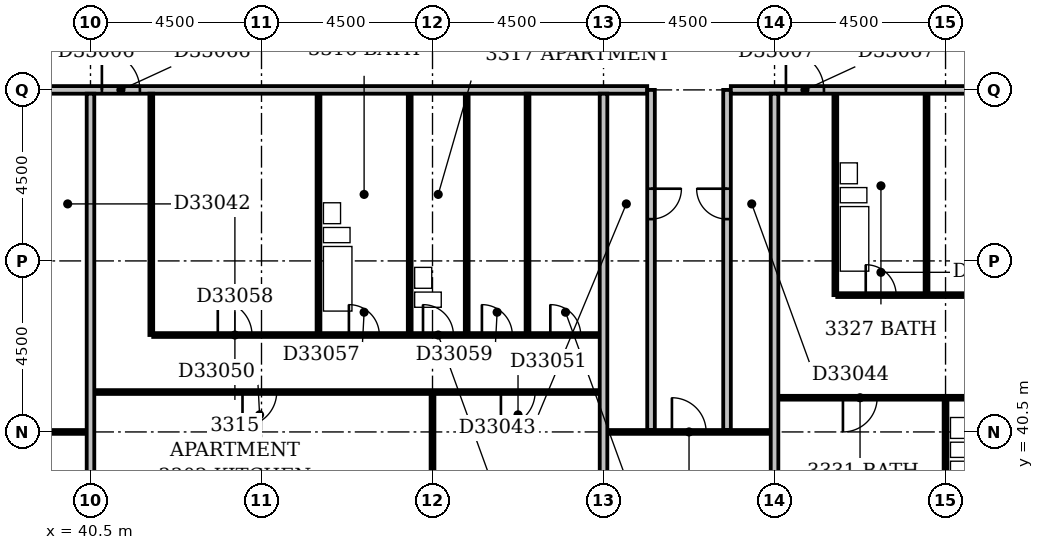
"""IFC4 building model, lengths in metres.
Left out: names, types, materials, properties, quantities, classifications, styles, units other than length and angle.
Written with IfcOpenShell. Run it as: python <this file> out.ifc"""

import sys

from ifc_helpers import new_model, si_unit, direction, frame, frame_2d, origin, place, context, subcontext, project, spatial, rectangle, extrude, element, fill, save


model = new_model("IFC4")
c1 = context("Model", 3, precision=1e-05, world=origin(), true_north=direction((0.0, 1.0)))
c2 = subcontext(c1, "Body", "Model", "MODEL_VIEW")
j1 = project(units=[si_unit("LENGTHUNIT", "METRE"), si_unit("PLANEANGLEUNIT", "RADIAN")], contexts=[c1])
p1 = place(None, origin())
s1 = spatial("IfcSite", under=j1, at=p1, CompositionType="ELEMENT")
p2 = place(p1, origin())
s2 = spatial("IfcBuilding", under=s1, at=p2, CompositionType="ELEMENT")
p3 = place(p2, frame((0.0, 0.0, 134.0)))
s3 = spatial("IfcBuildingStorey", under=s2, at=p3, CompositionType="ELEMENT", Elevation=134.0)
p4 = place(p3, frame((40.5, 36.5, 0.0), z_axis=(0.0, 0.0, 1.0), x_axis=(0.0, 1.0, 0.0)))
e1 = element("IfcWall", 1, at=p4, inside=s3, PredefinedType="PARTITIONING", context=c2, shape_type="SweptSolid", body=[
    extrude(rectangle(XDim=12.9, YDim=0.2, at=frame_2d((6.45, 0.0))), origin(), (0.0, 0.0, 1.0), 3.3),
])
p5 = place(p3, frame((49.5, 36.5, 0.0), z_axis=(0.0, 0.0, 1.0), x_axis=(0.0, 1.0, 0.0)))
e2 = element("IfcWall", 2, at=p5, inside=s3, PredefinedType="PARTITIONING", context=c2, shape_type="SweptSolid", body=[
    extrude(rectangle(XDim=5.0, YDim=0.1, at=frame_2d((2.5, 0.0))), origin(), (0.0, 0.0, 1.0), 3.3),
])
p6 = place(p3, frame((54.0, 36.5, 0.0), z_axis=(0.0, 0.0, 1.0), x_axis=(0.0, 1.0, 0.0)))
e3 = element("IfcWall", 3, at=p6, inside=s3, PredefinedType="PARTITIONING", context=c2, shape_type="SweptSolid", body=[
    extrude(rectangle(XDim=12.9, YDim=0.2, at=frame_2d((6.45, 0.0))), origin(), (0.0, 0.0, 1.0), 2.6),
])
p7 = place(p3, frame((58.5, 36.5, 0.0), z_axis=(0.0, 0.0, 1.0), x_axis=(0.0, 1.0, 0.0)))
e4 = element("IfcWall", 4, at=p7, inside=s3, PredefinedType="PARTITIONING", context=c2, shape_type="SweptSolid", body=[
    extrude(rectangle(XDim=12.9, YDim=0.2, at=frame_2d((6.45, 0.0))), origin(), (0.0, 0.0, 1.0), 3.3),
])
p8 = place(p3, frame((63.0, 36.5, 0.0), z_axis=(0.0, 0.0, 1.0), x_axis=(0.0, 1.0, 0.0)))
e5 = element("IfcWall", 5, at=p8, inside=s3, PredefinedType="PARTITIONING", context=c2, shape_type="SweptSolid", body=[
    extrude(rectangle(XDim=4.85, YDim=0.1, at=frame_2d((2.425, 0.0))), origin(), (0.0, 0.0, 1.0), 2.4),
])
p9 = place(p3, frame((36.1, 40.5, 0.0), z_axis=(0.0, 0.0, 1.0), x_axis=(1.0, 0.0, 0.0)))
e6 = element("IfcWall", 6, at=p9, inside=s3, PredefinedType="PARTITIONING", context=c2, shape_type="SweptSolid", body=[
    extrude(rectangle(XDim=4.3, YDim=0.1, at=frame_2d((2.15, 0.0))), origin(), (0.0, 0.0, 1.0), 3.3),
])
p10 = place(p9, frame((1.7, 0.0, 0.0)))
e7 = element("IfcOpeningElement", 7, at=p10, cuts=e6, PredefinedType="OPENING", context=c2, shape_type="SweptSolid", body=[
    extrude(rectangle(XDim=0.9, YDim=2.1, at=frame_2d((0.45, 1.05))), frame((0.0, 0.062, 0.0), z_axis=(0.0, -1.0, 0.0), x_axis=(1.0, 0.0, 0.0)), (0.0, 0.0, 1.0), 0.124),
])
p11 = place(p3, frame((54.1, 40.5, 0.0), z_axis=(0.0, 0.0, 1.0), x_axis=(1.0, 0.0, 0.0)))
e8 = element("IfcWall", 8, at=p11, inside=s3, PredefinedType="PARTITIONING", context=c2, shape_type="SweptSolid", body=[
    extrude(rectangle(XDim=4.3, YDim=0.1, at=frame_2d((2.15, 0.0))), origin(), (0.0, 0.0, 1.0), 3.3),
])
p12 = place(p11, frame((1.7, 0.0, 0.0)))
e9 = element("IfcOpeningElement", 9, at=p12, cuts=e8, PredefinedType="OPENING", context=c2, shape_type="SweptSolid", body=[
    extrude(rectangle(XDim=0.9, YDim=2.1, at=frame_2d((0.45, 1.05))), frame((0.0, 0.062, 0.0), z_axis=(0.0, -1.0, 0.0), x_axis=(1.0, 0.0, 0.0)), (0.0, 0.0, 1.0), 0.124),
])
p13 = place(p3, frame((55.25, 40.55, 0.0), z_axis=(0.0, 0.0, 1.0), x_axis=(0.0, 1.0, 0.0)))
e10 = element("IfcWall", 10, at=p13, inside=s3, PredefinedType="PARTITIONING", context=c2, shape_type="SweptSolid", body=[
    extrude(rectangle(XDim=8.95, YDim=0.2, at=frame_2d((4.475, 0.0))), origin(), (0.0, 0.0, 1.0), 3.3),
])
p14 = place(p13, frame((5.55, 0.0, 0.0)))
e11 = element("IfcOpeningElement", 11, at=p14, cuts=e10, PredefinedType="OPENING", context=c2, shape_type="SweptSolid", body=[
    extrude(rectangle(XDim=0.8, YDim=2.1, at=frame_2d((0.4, 1.05))), frame((0.0, 0.112, 0.0), z_axis=(0.0, -1.0, 0.0), x_axis=(1.0, 0.0, 0.0)), (0.0, 0.0, 1.0), 0.224),
])
p15 = place(p3, frame((57.25, 40.55, 0.0), z_axis=(0.0, 0.0, 1.0), x_axis=(0.0, 1.0, 0.0)))
e12 = element("IfcWall", 12, at=p15, inside=s3, PredefinedType="PARTITIONING", context=c2, shape_type="SweptSolid", body=[
    extrude(rectangle(XDim=8.95, YDim=0.2, at=frame_2d((4.475, 0.0))), origin(), (0.0, 0.0, 1.0), 3.3),
])
p16 = place(p15, frame((5.55, 0.0, 0.0)))
e13 = element("IfcOpeningElement", 13, at=p16, cuts=e12, PredefinedType="OPENING", context=c2, shape_type="SweptSolid", body=[
    extrude(rectangle(XDim=0.8, YDim=2.1, at=frame_2d((0.4, 1.05))), frame((0.0, 0.112, 0.0), z_axis=(0.0, -1.0, 0.0), x_axis=(1.0, 0.0, 0.0)), (0.0, 0.0, 1.0), 0.224),
])
p17 = place(p3, frame((58.6, 41.4, 0.0), z_axis=(0.0, 0.0, 1.0), x_axis=(1.0, 0.0, 0.0)))
e14 = element("IfcWall", 14, at=p17, inside=s3, PredefinedType="PARTITIONING", context=c2, shape_type="SweptSolid", body=[
    extrude(rectangle(XDim=9.5, YDim=0.1, at=frame_2d((4.75, 0.0))), origin(), (0.0, 0.0, 1.0), 3.3),
])
p18 = place(p17, frame((1.7, 0.0, 0.0)))
e15 = element("IfcOpeningElement", 15, at=p18, cuts=e14, PredefinedType="OPENING", context=c2, shape_type="SweptSolid", body=[
    extrude(rectangle(XDim=0.9, YDim=2.1, at=frame_2d((0.45, 1.05))), frame((0.0, 0.062, 0.0), z_axis=(0.0, -1.0, 0.0), x_axis=(1.0, 0.0, 0.0)), (0.0, 0.0, 1.0), 0.124),
])
p19 = place(p17, frame((7.35, 0.0, 0.0)))
e16 = element("IfcOpeningElement", 16, at=p19, cuts=e14, PredefinedType="OPENING", context=c2, shape_type="SweptSolid", body=[
    extrude(rectangle(XDim=0.9, YDim=2.1, at=frame_2d((0.45, 1.05))), frame((0.0, 0.062, 0.0), z_axis=(0.0, -1.0, 0.0), x_axis=(1.0, 0.0, 0.0)), (0.0, 0.0, 1.0), 0.124),
])
p20 = place(p3, frame((40.6, 41.55, 0.0), z_axis=(0.0, 0.0, 1.0), x_axis=(1.0, 0.0, 0.0)))
e17 = element("IfcWall", 17, at=p20, inside=s3, PredefinedType="PARTITIONING", context=c2, shape_type="SweptSolid", body=[
    extrude(rectangle(XDim=13.3, YDim=0.1, at=frame_2d((6.65, 0.0))), origin(), (0.0, 0.0, 1.0), 3.3),
])
p21 = place(p20, frame((3.9, 0.0, 0.0)))
e18 = element("IfcOpeningElement", 18, at=p21, cuts=e17, PredefinedType="OPENING", context=c2, shape_type="SweptSolid", body=[
    extrude(rectangle(XDim=0.9, YDim=2.1, at=frame_2d((0.45, 1.05))), frame((0.0, 0.062, 0.0), z_axis=(0.0, -1.0, 0.0), x_axis=(1.0, 0.0, 0.0)), (0.0, 0.0, 1.0), 0.124),
])
p22 = place(p20, frame((10.7, 0.0, 0.0)))
e19 = element("IfcOpeningElement", 19, at=p22, cuts=e17, PredefinedType="OPENING", context=c2, shape_type="SweptSolid", body=[
    extrude(rectangle(XDim=0.9, YDim=2.1, at=frame_2d((0.45, 1.05))), frame((0.0, 0.062, 0.0), z_axis=(0.0, -1.0, 0.0), x_axis=(1.0, 0.0, 0.0)), (0.0, 0.0, 1.0), 0.124),
])
p23 = place(p3, frame((42.1, 43.05, 0.0), z_axis=(0.0, 0.0, 1.0), x_axis=(0.0, 1.0, 0.0)))
e20 = element("IfcWall", 20, at=p23, inside=s3, PredefinedType="PARTITIONING", context=c2, shape_type="SweptSolid", body=[
    extrude(rectangle(XDim=6.35, YDim=0.1, at=frame_2d((3.175, 0.0))), origin(), (0.0, 0.0, 1.0), 3.3),
])
p24 = place(p3, frame((42.15, 43.05, 0.0), z_axis=(0.0, 0.0, 1.0), x_axis=(1.0, 0.0, 0.0)))
e21 = element("IfcWall", 21, at=p24, inside=s3, PredefinedType="PARTITIONING", context=c2, shape_type="SweptSolid", body=[
    extrude(rectangle(XDim=11.75, YDim=0.1, at=frame_2d((5.875, 0.0))), origin(), (0.0, 0.0, 1.0), 3.3),
])
p25 = place(p24, frame((5.15, 0.0, 0.0)))
e22 = element("IfcOpeningElement", 22, at=p25, cuts=e21, PredefinedType="OPENING", context=c2, shape_type="SweptSolid", body=[
    extrude(rectangle(XDim=0.8, YDim=2.1, at=frame_2d((0.4, 1.05))), frame((0.0, 0.062, 0.0), z_axis=(0.0, -1.0, 0.0), x_axis=(1.0, 0.0, 0.0)), (0.0, 0.0, 1.0), 0.124),
])
p26 = place(p24, frame((1.7, 0.0, 0.0)))
e23 = element("IfcOpeningElement", 23, at=p26, cuts=e21, PredefinedType="OPENING", context=c2, shape_type="SweptSolid", body=[
    extrude(rectangle(XDim=0.9, YDim=2.1, at=frame_2d((0.45, 1.05))), frame((0.0, 0.062, 0.0), z_axis=(0.0, -1.0, 0.0), x_axis=(1.0, 0.0, 0.0)), (0.0, 0.0, 1.0), 0.124),
])
p27 = place(p24, frame((8.65, 0.0, 0.0)))
e24 = element("IfcOpeningElement", 24, at=p27, cuts=e21, PredefinedType="OPENING", context=c2, shape_type="SweptSolid", body=[
    extrude(rectangle(XDim=0.8, YDim=2.1, at=frame_2d((0.4, 1.05))), frame((0.0, 0.062, 0.0), z_axis=(0.0, -1.0, 0.0), x_axis=(1.0, 0.0, 0.0)), (0.0, 0.0, 1.0), 0.124),
])
p28 = place(p24, frame((10.45, 0.0, 0.0)))
e25 = element("IfcOpeningElement", 25, at=p28, cuts=e21, PredefinedType="OPENING", context=c2, shape_type="SweptSolid", body=[
    extrude(rectangle(XDim=0.8, YDim=2.1, at=frame_2d((0.4, 1.05))), frame((0.0, 0.062, 0.0), z_axis=(0.0, -1.0, 0.0), x_axis=(1.0, 0.0, 0.0)), (0.0, 0.0, 1.0), 0.124),
])
p29 = place(p24, frame((7.1, 0.0, 0.0)))
e26 = element("IfcOpeningElement", 26, at=p29, cuts=e21, PredefinedType="OPENING", context=c2, shape_type="SweptSolid", body=[
    extrude(rectangle(XDim=0.8, YDim=2.1, at=frame_2d((0.4, 1.05))), frame((0.0, 0.062, 0.0), z_axis=(0.0, -1.0, 0.0), x_axis=(1.0, 0.0, 0.0)), (0.0, 0.0, 1.0), 0.124),
])
for number, where, z_axis, x_axis in (
    (27, (46.5, 43.1, 0.0), (0.0, 0.0, 1.0), (0.0, 1.0, 0.0)),
    (28, (48.9, 43.1, 0.0), (0.0, 0.0, 1.0), (0.0, 1.0, 0.0)),
    (29, (50.4, 43.1, 0.0), (0.0, 0.0, 1.0), (0.0, 1.0, 0.0)),
):
    element("IfcWall", number, at=place(p3, frame(where, z_axis=z_axis, x_axis=x_axis)), inside=s3, PredefinedType="PLUMBINGWALL", context=c2, shape_type="SweptSolid", body=[
        extrude(rectangle(XDim=6.3, YDim=0.1, at=frame_2d((3.15, 0.0))), origin(), (0.0, 0.0, 1.0), 3.3),
    ])
p30 = place(p3, frame((52.0, 43.1, 0.0), z_axis=(0.0, 0.0, 1.0), x_axis=(0.0, 1.0, 0.0)))
e30 = element("IfcWall", 30, at=p30, inside=s3, PredefinedType="PARTITIONING", context=c2, shape_type="SweptSolid", body=[
    extrude(rectangle(XDim=6.3, YDim=0.1, at=frame_2d((3.15, 0.0))), origin(), (0.0, 0.0, 1.0), 3.3),
])
p31 = place(p3, frame((60.1, 44.1, 0.0), z_axis=(0.0, 0.0, 1.0), x_axis=(0.0, 1.0, 0.0)))
e31 = element("IfcWall", 31, at=p31, inside=s3, PredefinedType="PLUMBINGWALL", context=c2, shape_type="SweptSolid", body=[
    extrude(rectangle(XDim=5.3, YDim=0.1, at=frame_2d((2.65, 0.0))), origin(), (0.0, 0.0, 1.0), 3.3),
])
p32 = place(p3, frame((60.15, 44.1, 0.0), z_axis=(0.0, 0.0, 1.0), x_axis=(1.0, 0.0, 0.0)))
e32 = element("IfcWall", 32, at=p32, inside=s3, PredefinedType="PARTITIONING", context=c2, shape_type="SweptSolid", body=[
    extrude(rectangle(XDim=7.95, YDim=0.1, at=frame_2d((3.975, 0.0))), origin(), (0.0, 0.0, 1.0), 3.3),
])
p33 = place(p32, frame((0.75, 0.0, 0.0)))
e33 = element("IfcOpeningElement", 33, at=p33, cuts=e32, PredefinedType="OPENING", context=c2, shape_type="SweptSolid", body=[
    extrude(rectangle(XDim=0.8, YDim=2.1, at=frame_2d((0.4, 1.05))), frame((0.0, 0.062, 0.0), z_axis=(0.0, -1.0, 0.0), x_axis=(1.0, 0.0, 0.0)), (0.0, 0.0, 1.0), 0.124),
])
p34 = place(p32, frame((4.4, 0.0, 0.0)))
e34 = element("IfcOpeningElement", 34, at=p34, cuts=e32, PredefinedType="OPENING", context=c2, shape_type="SweptSolid", body=[
    extrude(rectangle(XDim=0.9, YDim=2.1, at=frame_2d((0.45, 1.05))), frame((0.0, 0.062, 0.0), z_axis=(0.0, -1.0, 0.0), x_axis=(1.0, 0.0, 0.0)), (0.0, 0.0, 1.0), 0.124),
])
p35 = place(p3, frame((62.5, 44.15, 0.0), z_axis=(0.0, 0.0, 1.0), x_axis=(0.0, 1.0, 0.0)))
e35 = element("IfcWall", 35, at=p35, inside=s3, PredefinedType="PLUMBINGWALL", context=c2, shape_type="SweptSolid", body=[
    extrude(rectangle(XDim=5.25, YDim=0.1, at=frame_2d((2.625, 0.0))), origin(), (0.0, 0.0, 1.0), 2.4),
])
p36 = place(p3, frame((39.35, 49.5, 0.0), z_axis=(0.0, 0.0, 1.0), x_axis=(1.0, 0.0, 0.0)))
e36 = element("IfcWall", 36, at=p36, inside=s3, PredefinedType="PARTITIONING", context=c2, shape_type="SweptSolid", body=[
    extrude(rectangle(XDim=15.8, YDim=0.2, at=frame_2d((7.9, 0.0))), origin(), (0.0, 0.0, 1.0), 3.3),
])
p37 = place(p36, frame((1.45, 0.0, 0.0)))
e37 = element("IfcOpeningElement", 37, at=p37, cuts=e36, PredefinedType="OPENING", context=c2, shape_type="SweptSolid", body=[
    extrude(rectangle(XDim=1.0, YDim=2.1, at=frame_2d((0.5, 1.05))), frame((0.0, 0.112, 0.0), z_axis=(0.0, -1.0, 0.0), x_axis=(1.0, 0.0, 0.0)), (0.0, 0.0, 1.0), 0.224),
])
p38 = place(p3, frame((57.35, 49.5, 0.0), z_axis=(0.0, 0.0, 1.0), x_axis=(1.0, 0.0, 0.0)))
e38 = element("IfcWall", 38, at=p38, inside=s3, PredefinedType="PARTITIONING", context=c2, shape_type="SweptSolid", body=[
    extrude(rectangle(XDim=9.65, YDim=0.2, at=frame_2d((4.825, 0.0))), origin(), (0.0, 0.0, 1.0), 3.3),
])
p39 = place(p38, frame((1.45, 0.0, 0.0)))
e39 = element("IfcOpeningElement", 39, at=p39, cuts=e38, PredefinedType="OPENING", context=c2, shape_type="SweptSolid", body=[
    extrude(rectangle(XDim=1.0, YDim=2.1, at=frame_2d((0.5, 1.05))), frame((0.0, 0.112, 0.0), z_axis=(0.0, -1.0, 0.0), x_axis=(1.0, 0.0, 0.0)), (0.0, 0.0, 1.0), 0.224),
])
p40 = place(p12, origin())
e40 = element("IfcDoor", 40, at=p40, inside=s3, OperationType="SINGLE_SWING_LEFT", PredefinedType="DOOR", context=c2, shape_type="SweptSolid", body=[
    extrude(rectangle(XDim=0.9, YDim=2.1, at=frame_2d((0.45, 1.05))), frame((0.0, 0.025, 0.0), z_axis=(0.0, -1.0, 0.0), x_axis=(1.0, 0.0, 0.0)), (0.0, 0.0, 1.0), 0.05),
])
fill(e9, e40)
p41 = place(p14, origin())
e41 = element("IfcDoor", 41, at=p41, inside=s3, OperationType="SINGLE_SWING_RIGHT", PredefinedType="DOOR", context=c2, shape_type="SweptSolid", body=[
    extrude(rectangle(XDim=0.8, YDim=2.1, at=frame_2d((0.4, 1.05))), frame((0.0, 0.025, 0.0), z_axis=(0.0, -1.0, 0.0), x_axis=(1.0, 0.0, 0.0)), (0.0, 0.0, 1.0), 0.05),
])
fill(e11, e41)
p42 = place(p16, frame((0.8, 0.0, 0.0), z_axis=(0.0, 0.0, 1.0), x_axis=(-1.0, 0.0, 0.0)))
e42 = element("IfcDoor", 42, at=p42, inside=s3, OperationType="SINGLE_SWING_LEFT", PredefinedType="DOOR", context=c2, shape_type="SweptSolid", body=[
    extrude(rectangle(XDim=0.8, YDim=2.1, at=frame_2d((0.4, 1.05))), frame((0.0, 0.025, 0.0), z_axis=(0.0, -1.0, 0.0), x_axis=(1.0, 0.0, 0.0)), (0.0, 0.0, 1.0), 0.05),
])
fill(e13, e42)
p43 = place(p18, frame((0.9, 0.0, 0.0), z_axis=(0.0, 0.0, 1.0), x_axis=(-1.0, 0.0, 0.0)))
e43 = element("IfcDoor", 43, at=p43, inside=s3, OperationType="SINGLE_SWING_RIGHT", PredefinedType="DOOR", context=c2, shape_type="SweptSolid", body=[
    extrude(rectangle(XDim=0.9, YDim=2.1, at=frame_2d((0.45, 1.05))), frame((0.0, 0.025, 0.0), z_axis=(0.0, -1.0, 0.0), x_axis=(1.0, 0.0, 0.0)), (0.0, 0.0, 1.0), 0.05),
])
fill(e15, e43)
p44 = place(p21, frame((0.9, 0.0, 0.0), z_axis=(0.0, 0.0, 1.0), x_axis=(-1.0, 0.0, 0.0)))
e44 = element("IfcDoor", 44, at=p44, inside=s3, OperationType="SINGLE_SWING_RIGHT", PredefinedType="DOOR", context=c2, shape_type="SweptSolid", body=[
    extrude(rectangle(XDim=0.9, YDim=2.1, at=frame_2d((0.45, 1.05))), frame((0.0, 0.025, 0.0), z_axis=(0.0, -1.0, 0.0), x_axis=(1.0, 0.0, 0.0)), (0.0, 0.0, 1.0), 0.05),
])
fill(e18, e44)
p45 = place(p22, frame((0.9, 0.0, 0.0), z_axis=(0.0, 0.0, 1.0), x_axis=(-1.0, 0.0, 0.0)))
e45 = element("IfcDoor", 45, at=p45, inside=s3, OperationType="SINGLE_SWING_RIGHT", PredefinedType="DOOR", context=c2, shape_type="SweptSolid", body=[
    extrude(rectangle(XDim=0.9, YDim=2.1, at=frame_2d((0.45, 1.05))), frame((0.0, 0.025, 0.0), z_axis=(0.0, -1.0, 0.0), x_axis=(1.0, 0.0, 0.0)), (0.0, 0.0, 1.0), 0.05),
])
fill(e19, e45)
p46 = place(p25, origin())
e46 = element("IfcDoor", 46, at=p46, inside=s3, OperationType="SINGLE_SWING_LEFT", PredefinedType="DOOR", context=c2, shape_type="SweptSolid", body=[
    extrude(rectangle(XDim=0.8, YDim=2.1, at=frame_2d((0.4, 1.05))), frame((0.0, 0.025, 0.0), z_axis=(0.0, -1.0, 0.0), x_axis=(1.0, 0.0, 0.0)), (0.0, 0.0, 1.0), 0.05),
])
fill(e22, e46)
p47 = place(p26, origin())
e47 = element("IfcDoor", 47, at=p47, inside=s3, OperationType="SINGLE_SWING_LEFT", PredefinedType="DOOR", context=c2, shape_type="SweptSolid", body=[
    extrude(rectangle(XDim=0.9, YDim=2.1, at=frame_2d((0.45, 1.05))), frame((0.0, 0.025, 0.0), z_axis=(0.0, -1.0, 0.0), x_axis=(1.0, 0.0, 0.0)), (0.0, 0.0, 1.0), 0.05),
])
fill(e23, e47)
p48 = place(p27, origin())
e48 = element("IfcDoor", 48, at=p48, inside=s3, OperationType="SINGLE_SWING_LEFT", PredefinedType="DOOR", context=c2, shape_type="SweptSolid", body=[
    extrude(rectangle(XDim=0.8, YDim=2.1, at=frame_2d((0.4, 1.05))), frame((0.0, 0.025, 0.0), z_axis=(0.0, -1.0, 0.0), x_axis=(1.0, 0.0, 0.0)), (0.0, 0.0, 1.0), 0.05),
])
fill(e24, e48)
p49 = place(p28, origin())
e49 = element("IfcDoor", 49, at=p49, inside=s3, OperationType="SINGLE_SWING_LEFT", PredefinedType="DOOR", context=c2, shape_type="SweptSolid", body=[
    extrude(rectangle(XDim=0.8, YDim=2.1, at=frame_2d((0.4, 1.05))), frame((0.0, 0.025, 0.0), z_axis=(0.0, -1.0, 0.0), x_axis=(1.0, 0.0, 0.0)), (0.0, 0.0, 1.0), 0.05),
])
fill(e25, e49)
p50 = place(p29, origin())
e50 = element("IfcDoor", 50, at=p50, inside=s3, OperationType="SINGLE_SWING_LEFT", PredefinedType="DOOR", context=c2, shape_type="SweptSolid", body=[
    extrude(rectangle(XDim=0.8, YDim=2.1, at=frame_2d((0.4, 1.05))), frame((0.0, 0.025, 0.0), z_axis=(0.0, -1.0, 0.0), x_axis=(1.0, 0.0, 0.0)), (0.0, 0.0, 1.0), 0.05),
])
fill(e26, e50)
p51 = place(p33, origin())
e51 = element("IfcDoor", 51, at=p51, inside=s3, OperationType="SINGLE_SWING_LEFT", PredefinedType="DOOR", context=c2, shape_type="SweptSolid", body=[
    extrude(rectangle(XDim=0.8, YDim=2.1, at=frame_2d((0.4, 1.05))), frame((0.0, 0.025, 0.0), z_axis=(0.0, -1.0, 0.0), x_axis=(1.0, 0.0, 0.0)), (0.0, 0.0, 1.0), 0.05),
])
fill(e33, e51)
p52 = place(p37, origin())
e52 = element("IfcDoor", 52, at=p52, inside=s3, OperationType="SINGLE_SWING_LEFT", PredefinedType="DOOR", context=c2, shape_type="SweptSolid", body=[
    extrude(rectangle(XDim=1.0, YDim=2.1, at=frame_2d((0.5, 1.05))), frame((0.0, 0.025, 0.0), z_axis=(0.0, -1.0, 0.0), x_axis=(1.0, 0.0, 0.0)), (0.0, 0.0, 1.0), 0.05),
])
fill(e37, e52)
p53 = place(p39, origin())
e53 = element("IfcDoor", 53, at=p53, inside=s3, OperationType="SINGLE_SWING_LEFT", PredefinedType="DOOR", context=c2, shape_type="SweptSolid", body=[
    extrude(rectangle(XDim=1.0, YDim=2.1, at=frame_2d((0.5, 1.05))), frame((0.0, 0.025, 0.0), z_axis=(0.0, -1.0, 0.0), x_axis=(1.0, 0.0, 0.0)), (0.0, 0.0, 1.0), 0.05),
])
fill(e39, e53)
save(model, sys.argv[1])
